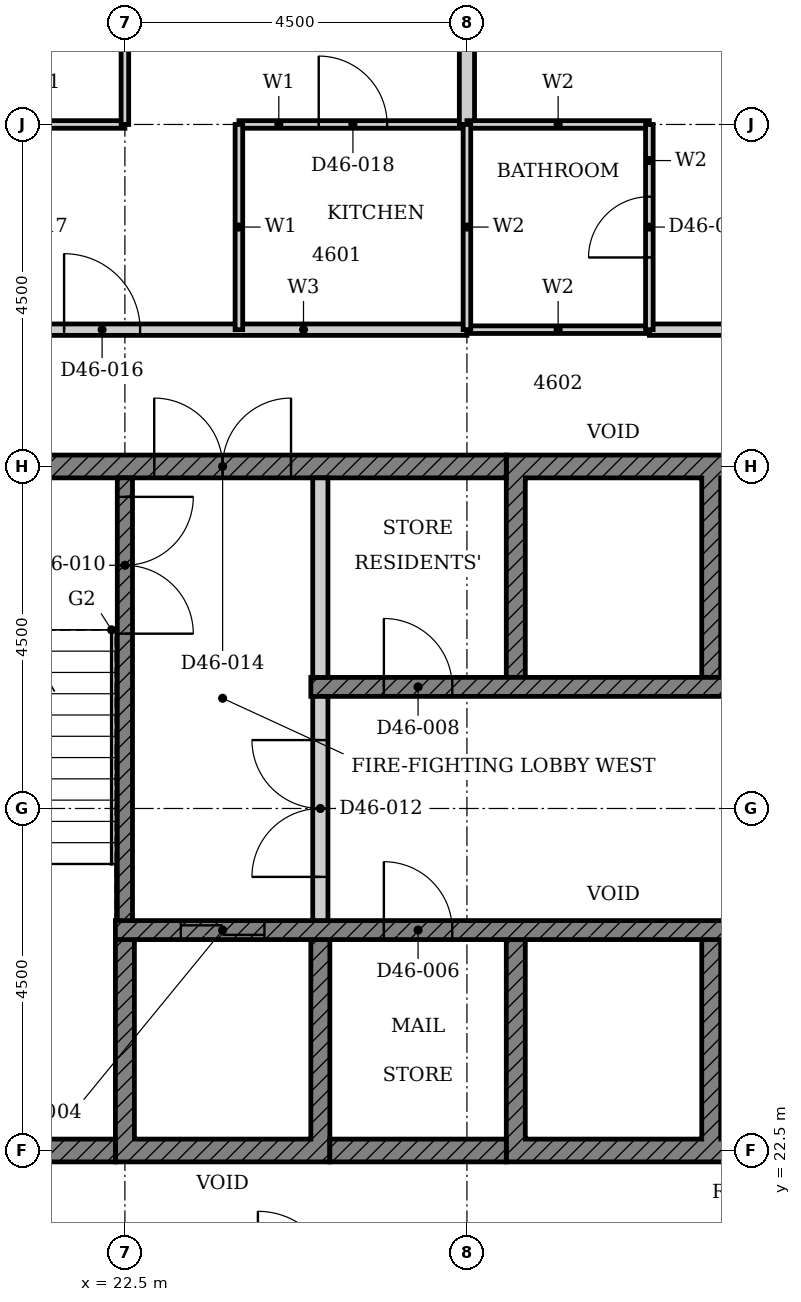
"""IFC4 building model, lengths in metres.
Left out: names, types, materials, properties, quantities, classifications, styles, units other than length and angle.
Written with IfcOpenShell. Run it as: python <this file> out.ifc"""

import sys

from ifc_helpers import new_model, si_unit, direction, frame, frame_2d, origin, place, context, subcontext, project, spatial, polyline, rectangle, outline, extrude, element, fill, save


model = new_model("IFC4")
c1 = context("Model", 3, precision=1e-05, world=origin(), true_north=direction((0.0, 1.0)))
c2 = subcontext(c1, "Body", "Model", "MODEL_VIEW")
j1 = project(units=[si_unit("LENGTHUNIT", "METRE"), si_unit("PLANEANGLEUNIT", "RADIAN")], contexts=[c1])
p1 = place(None, origin())
s1 = spatial("IfcSite", under=j1, at=p1, CompositionType="ELEMENT")
p2 = place(p1, origin())
s2 = spatial("IfcBuilding", under=s1, at=p2, CompositionType="ELEMENT")
p3 = place(p2, frame((0.0, 0.0, 183.9)))
s3 = spatial("IfcBuildingStorey", under=s2, at=p3, CompositionType="ELEMENT", Elevation=183.9)
p4 = place(p3, origin())
e1 = element("IfcWall", 1, at=p4, inside=s3, PredefinedType="SHEAR", context=c2, shape_type="SweptSolid", body=[
    extrude(outline(polyline([(22.375, 22.35), (25.197, 22.35), (25.197, 25.275), (24.947, 25.275), (24.947, 22.65), (22.625, 22.65), (22.625, 25.275), (22.375, 25.275), (22.375, 22.35)])), origin(), (0.0, 0.0, 1.0), 3.3),
])
p5 = place(p3, origin())
e2 = element("IfcWall", 2, at=p5, inside=s3, PredefinedType="SHEAR", context=c2, shape_type="SweptSolid", body=[
    extrude(outline(polyline([(27.518, 22.35), (32.911, 22.35), (32.911, 25.275), (32.661, 25.275), (32.661, 22.65), (30.339, 22.65), (30.339, 25.275), (30.089, 25.275), (30.089, 22.65), (27.768, 22.65), (27.768, 25.275), (27.518, 25.275), (27.518, 22.35)])), origin(), (0.0, 0.0, 1.0), 3.3),
])
p6 = place(p3, origin())
e3 = element("IfcWall", 3, at=p6, inside=s3, PredefinedType="SHEAR", context=c2, shape_type="SweptSolid", body=[
    extrude(outline(polyline([(27.518, 28.725), (27.768, 28.725), (27.768, 31.35), (30.089, 31.35), (30.089, 28.725), (30.339, 28.725), (30.339, 31.35), (32.661, 31.35), (32.661, 28.725), (32.911, 28.725), (32.911, 31.65), (27.518, 31.65), (27.518, 28.725)])), origin(), (0.0, 0.0, 1.0), 3.3),
])
p7 = place(p3, frame((18.15, 22.5, 0.0), z_axis=(0.0, 0.0, 1.0), x_axis=(1.0, 0.0, 0.0)))
e4 = element("IfcWall", 4, at=p7, inside=s3, PredefinedType="SHEAR", context=c2, shape_type="SweptSolid", body=[
    extrude(rectangle(XDim=4.225, YDim=0.3, at=frame_2d((2.113, 0.0))), origin(), (0.0, 0.0, 1.0), 3.3),
])
p8 = place(p3, frame((25.197, 22.5, 0.0), z_axis=(0.0, 0.0, 1.0), x_axis=(1.0, 0.0, 0.0)))
e5 = element("IfcWall", 5, at=p8, inside=s3, PredefinedType="SHEAR", context=c2, shape_type="SweptSolid", body=[
    extrude(rectangle(XDim=2.321, YDim=0.3, at=frame_2d((1.161, 0.0))), origin(), (0.0, 0.0, 1.0), 3.3),
])
p9 = place(p3, frame((18.15, 31.5, 0.0), z_axis=(0.0, 0.0, 1.0), x_axis=(1.0, 0.0, 0.0)))
e6 = element("IfcWall", 6, at=p9, inside=s3, PredefinedType="SHEAR", context=c2, shape_type="SweptSolid", body=[
    extrude(rectangle(XDim=9.368, YDim=0.3, at=frame_2d((4.684, 0.0))), origin(), (0.0, 0.0, 1.0), 3.3),
])
p10 = place(p9, frame((4.736, 0.0, 0.0)))
e7 = element("IfcOpeningElement", 7, at=p10, cuts=e6, PredefinedType="OPENING", context=c2, shape_type="SweptSolid", body=[
    extrude(rectangle(XDim=1.8, YDim=2.1, at=frame_2d((0.9, 1.05))), frame((0.0, 0.16, 0.0), z_axis=(0.0, -1.0, 0.0), x_axis=(1.0, 0.0, 0.0)), (0.0, 0.0, 1.0), 0.32),
])
p11 = place(p3, frame((22.375, 25.4, 0.0), z_axis=(0.0, 0.0, 1.0), x_axis=(1.0, 0.0, 0.0)))
e8 = element("IfcWall", 8, at=p11, inside=s3, PredefinedType="SHEAR", context=c2, shape_type="SweptSolid", body=[
    extrude(rectangle(XDim=15.678, YDim=0.25, at=frame_2d((7.839, 0.0))), origin(), (0.0, 0.0, 1.0), 3.3),
])
p12 = place(p11, frame((8.575, 0.0, 0.0)))
e9 = element("IfcOpeningElement", 9, at=p12, cuts=e8, PredefinedType="OPENING", context=c2, shape_type="SweptSolid", body=[
    extrude(rectangle(XDim=1.1, YDim=2.1, at=frame_2d((0.55, 1.05))), frame((0.0, 0.135, 0.0), z_axis=(0.0, -1.0, 0.0), x_axis=(1.0, 0.0, 0.0)), (0.0, 0.0, 1.0), 0.27),
])
p13 = place(p11, frame((0.861, 0.0, 0.0)))
e10 = element("IfcOpeningElement", 10, at=p13, cuts=e8, PredefinedType="OPENING", context=c2, shape_type="SweptSolid", body=[
    extrude(rectangle(XDim=1.1, YDim=2.1, at=frame_2d((0.55, 1.05))), frame((0.0, 0.135, 0.0), z_axis=(0.0, -1.0, 0.0), x_axis=(1.0, 0.0, 0.0)), (0.0, 0.0, 1.0), 0.27),
])
p14 = place(p11, frame((3.532, 0.0, 0.0)))
e11 = element("IfcOpeningElement", 11, at=p14, cuts=e8, PredefinedType="OPENING", context=c2, shape_type="SweptSolid", body=[
    extrude(rectangle(XDim=0.9, YDim=2.1, at=frame_2d((0.45, 1.05))), frame((0.0, 0.135, 0.0), z_axis=(0.0, -1.0, 0.0), x_axis=(1.0, 0.0, 0.0)), (0.0, 0.0, 1.0), 0.27),
])
p15 = place(p11, frame((12.532, 0.0, 0.0)))
e12 = element("IfcOpeningElement", 12, at=p15, cuts=e8, PredefinedType="OPENING", context=c2, shape_type="SweptSolid", body=[
    extrude(rectangle(XDim=0.9, YDim=2.1, at=frame_2d((0.45, 1.05))), frame((0.0, 0.135, 0.0), z_axis=(0.0, -1.0, 0.0), x_axis=(1.0, 0.0, 0.0)), (0.0, 0.0, 1.0), 0.27),
])
p16 = place(p3, frame((24.947, 28.6, 0.0), z_axis=(0.0, 0.0, 1.0), x_axis=(1.0, 0.0, 0.0)))
e13 = element("IfcWall", 13, at=p16, inside=s3, PredefinedType="SHEAR", context=c2, shape_type="SweptSolid", body=[
    extrude(rectangle(XDim=15.678, YDim=0.25, at=frame_2d((7.839, 0.0))), origin(), (0.0, 0.0, 1.0), 3.3),
])
p17 = place(p16, frame((6.004, 0.0, 0.0)))
e14 = element("IfcOpeningElement", 14, at=p17, cuts=e13, PredefinedType="OPENING", context=c2, shape_type="SweptSolid", body=[
    extrude(rectangle(XDim=1.1, YDim=2.1, at=frame_2d((0.55, 1.05))), frame((0.0, 0.135, 0.0), z_axis=(0.0, -1.0, 0.0), x_axis=(1.0, 0.0, 0.0)), (0.0, 0.0, 1.0), 0.27),
])
p18 = place(p16, frame((11.146, 0.0, 0.0)))
e15 = element("IfcOpeningElement", 15, at=p18, cuts=e13, PredefinedType="OPENING", context=c2, shape_type="SweptSolid", body=[
    extrude(rectangle(XDim=1.1, YDim=2.1, at=frame_2d((0.55, 1.05))), frame((0.0, 0.135, 0.0), z_axis=(0.0, -1.0, 0.0), x_axis=(1.0, 0.0, 0.0)), (0.0, 0.0, 1.0), 0.27),
])
p19 = place(p16, frame((13.718, 0.0, 0.0)))
e16 = element("IfcOpeningElement", 16, at=p19, cuts=e13, PredefinedType="OPENING", context=c2, shape_type="SweptSolid", body=[
    extrude(rectangle(XDim=1.1, YDim=2.1, at=frame_2d((0.55, 1.05))), frame((0.0, 0.135, 0.0), z_axis=(0.0, -1.0, 0.0), x_axis=(1.0, 0.0, 0.0)), (0.0, 0.0, 1.0), 0.27),
])
p20 = place(p16, frame((0.961, 0.0, 0.0)))
e17 = element("IfcOpeningElement", 17, at=p20, cuts=e13, PredefinedType="OPENING", context=c2, shape_type="SweptSolid", body=[
    extrude(rectangle(XDim=0.9, YDim=2.1, at=frame_2d((0.45, 1.05))), frame((0.0, 0.135, 0.0), z_axis=(0.0, -1.0, 0.0), x_axis=(1.0, 0.0, 0.0)), (0.0, 0.0, 1.0), 0.27),
])
p21 = place(p16, frame((8.675, 0.0, 0.0)))
e18 = element("IfcOpeningElement", 18, at=p21, cuts=e13, PredefinedType="OPENING", context=c2, shape_type="SweptSolid", body=[
    extrude(rectangle(XDim=0.9, YDim=2.1, at=frame_2d((0.45, 1.05))), frame((0.0, 0.135, 0.0), z_axis=(0.0, -1.0, 0.0), x_axis=(1.0, 0.0, 0.0)), (0.0, 0.0, 1.0), 0.27),
])
p22 = place(p3, frame((25.072, 28.725, 0.0), z_axis=(0.0, 0.0, 1.0), x_axis=(0.0, 1.0, 0.0)))
e19 = element("IfcWall", 19, at=p22, inside=s3, PredefinedType="PARTITIONING", context=c2, shape_type="SweptSolid", body=[
    extrude(rectangle(XDim=2.625, YDim=0.2, at=frame_2d((1.312, 0.0))), origin(), (0.0, 0.0, 1.0), 3.3),
])
p23 = place(p3, frame((22.5, 31.35, 0.0), z_axis=(0.0, 0.0, 1.0), x_axis=(0.0, -1.0, 0.0)))
e20 = element("IfcWall", 20, at=p23, inside=s3, PredefinedType="SHEAR", context=c2, shape_type="SweptSolid", body=[
    extrude(rectangle(XDim=5.825, YDim=0.2, at=frame_2d((2.913, 0.0))), origin(), (0.0, 0.0, 1.0), 3.3),
])
p24 = place(p23, frame((0.25, 0.0, 0.0)))
e21 = element("IfcOpeningElement", 21, at=p24, cuts=e20, PredefinedType="OPENING", context=c2, shape_type="SweptSolid", body=[
    extrude(rectangle(XDim=1.8, YDim=2.1, at=frame_2d((0.9, 1.05))), frame((0.0, 0.11, 0.0), z_axis=(0.0, -1.0, 0.0), x_axis=(1.0, 0.0, 0.0)), (0.0, 0.0, 1.0), 0.22),
])
p25 = place(p3, frame((25.072, 25.525, 0.0), z_axis=(0.0, 0.0, 1.0), x_axis=(0.0, 1.0, 0.0)))
e22 = element("IfcWall", 22, at=p25, inside=s3, PredefinedType="PARTITIONING", context=c2, shape_type="SweptSolid", body=[
    extrude(rectangle(XDim=2.95, YDim=0.2, at=frame_2d((1.475, 0.0))), origin(), (0.0, 0.0, 1.0), 3.3),
])
p26 = place(p25, frame((0.575, 0.0, 0.0)))
e23 = element("IfcOpeningElement", 23, at=p26, cuts=e22, PredefinedType="OPENING", context=c2, shape_type="SweptSolid", body=[
    extrude(rectangle(XDim=1.8, YDim=2.1, at=frame_2d((0.9, 1.05))), frame((0.0, 0.11, 0.0), z_axis=(0.0, -1.0, 0.0), x_axis=(1.0, 0.0, 0.0)), (0.0, 0.0, 1.0), 0.22),
])
p27 = place(p3, frame((20.4, 33.3, 0.0), z_axis=(0.0, 0.0, 1.0), x_axis=(1.0, 0.0, 0.0)))
e24 = element("IfcWall", 24, at=p27, inside=s3, PredefinedType="PARTITIONING", context=c2, shape_type="SweptSolid", body=[
    extrude(rectangle(XDim=6.6, YDim=0.15, at=frame_2d((3.3, 0.0))), origin(), (0.0, 0.0, 1.0), 3.3),
])
p28 = place(p27, frame((1.3, 0.0, 0.0)))
e25 = element("IfcOpeningElement", 25, at=p28, cuts=e24, PredefinedType="OPENING", context=c2, shape_type="SweptSolid", body=[
    extrude(rectangle(XDim=1.0, YDim=2.2, at=frame_2d((0.5, 1.1))), frame((0.0, 0.085, 0.0), z_axis=(0.0, -1.0, 0.0), x_axis=(1.0, 0.0, 0.0)), (0.0, 0.0, 1.0), 0.17),
])
p29 = place(p3, frame((29.4, 33.3, 0.0), z_axis=(0.0, 0.0, 1.0), x_axis=(1.0, 0.0, 0.0)))
e26 = element("IfcWall", 26, at=p29, inside=s3, PredefinedType="PARTITIONING", context=c2, shape_type="SweptSolid", body=[
    extrude(rectangle(XDim=13.2, YDim=0.15, at=frame_2d((6.6, 0.0))), origin(), (0.0, 0.0, 1.0), 3.3),
])
p30 = place(p29, frame((1.3, 0.0, 0.0)))
e27 = element("IfcOpeningElement", 27, at=p30, cuts=e26, PredefinedType="OPENING", context=c2, shape_type="SweptSolid", body=[
    extrude(rectangle(XDim=1.0, YDim=2.2, at=frame_2d((0.5, 1.1))), frame((0.0, 0.085, 0.0), z_axis=(0.0, -1.0, 0.0), x_axis=(1.0, 0.0, 0.0)), (0.0, 0.0, 1.0), 0.17),
])
p31 = place(p29, frame((10.9, 0.0, 0.0)))
e28 = element("IfcOpeningElement", 28, at=p31, cuts=e26, PredefinedType="OPENING", context=c2, shape_type="SweptSolid", body=[
    extrude(rectangle(XDim=1.0, YDim=2.2, at=frame_2d((0.5, 1.1))), frame((0.0, 0.085, 0.0), z_axis=(0.0, -1.0, 0.0), x_axis=(1.0, 0.0, 0.0)), (0.0, 0.0, 1.0), 0.17),
])
p32 = place(p3, frame((20.4, 36.0, 0.0), z_axis=(0.0, 0.0, 1.0), x_axis=(1.0, 0.0, 0.0)))
e29 = element("IfcWall", 29, at=p32, inside=s3, PredefinedType="PARTITIONING", context=c2, shape_type="SweptSolid", body=[
    extrude(rectangle(XDim=2.1, YDim=0.1, at=frame_2d((1.05, 0.0))), origin(), (0.0, 0.0, 1.0), 3.3),
])
p33 = place(p3, frame((24.0, 36.0, 0.0), z_axis=(0.0, 0.0, 1.0), x_axis=(1.0, 0.0, 0.0)))
e30 = element("IfcWall", 30, at=p33, inside=s3, PredefinedType="PARTITIONING", context=c2, shape_type="SweptSolid", body=[
    extrude(rectangle(XDim=3.0, YDim=0.1, at=frame_2d((1.5, 0.0))), origin(), (0.0, 0.0, 1.0), 3.3),
])
p34 = place(p33, frame((1.05, 0.0, 0.0)))
e31 = element("IfcOpeningElement", 31, at=p34, cuts=e30, PredefinedType="OPENING", context=c2, shape_type="SweptSolid", body=[
    extrude(rectangle(XDim=0.9, YDim=2.1, at=frame_2d((0.45, 1.05))), frame((0.0, 0.06, 0.0), z_axis=(0.0, -1.0, 0.0), x_axis=(1.0, 0.0, 0.0)), (0.0, 0.0, 1.0), 0.12),
])
p35 = place(p3, frame((22.5, 36.0, 0.0), z_axis=(0.0, 0.0, 1.0), x_axis=(0.0, 1.0, 0.0)))
e32 = element("IfcWall", 32, at=p35, inside=s3, PredefinedType="PARTITIONING", context=c2, shape_type="SweptSolid", body=[
    extrude(rectangle(XDim=4.815, YDim=0.1, at=frame_2d((2.407, 0.0))), origin(), (0.0, 0.0, 1.0), 3.3),
])
p36 = place(p35, frame((1.8, 0.0, 0.0)))
e33 = element("IfcOpeningElement", 33, at=p36, cuts=e32, PredefinedType="OPENING", context=c2, shape_type="SweptSolid", body=[
    extrude(rectangle(XDim=0.9, YDim=2.1, at=frame_2d((0.45, 1.05))), frame((0.0, 0.06, 0.0), z_axis=(0.0, -1.0, 0.0), x_axis=(1.0, 0.0, 0.0)), (0.0, 0.0, 1.0), 0.12),
])
p37 = place(p3, frame((24.0, 33.3, 0.0), z_axis=(0.0, 0.0, 1.0), x_axis=(0.0, 1.0, 0.0)))
e34 = element("IfcWall", 34, at=p37, inside=s3, PredefinedType="PARTITIONING", context=c2, shape_type="SweptSolid", body=[
    extrude(rectangle(XDim=2.7, YDim=0.1, at=frame_2d((1.35, 0.0))), origin(), (0.0, 0.0, 1.0), 3.3),
])
p38 = place(p3, frame((27.0, 36.0, 0.0), z_axis=(0.0, 0.0, 1.0), x_axis=(0.0, 1.0, 0.0)))
e35 = element("IfcWall", 35, at=p38, inside=s3, PredefinedType="PARTITIONING", context=c2, shape_type="SweptSolid", body=[
    extrude(rectangle(XDim=4.69, YDim=0.2, at=frame_2d((2.345, 0.0))), origin(), (0.0, 0.0, 1.0), 3.3),
])
for number, where, z_axis, x_axis in (
    (36, (27.0, 33.3, 0.0), (0.0, 0.0, 1.0), (1.0, 0.0, 0.0)),
    (37, (27.0, 36.0, 0.0), (0.0, 0.0, 1.0), (1.0, 0.0, 0.0)),
):
    element("IfcWall", number, at=place(p3, frame(where, z_axis=z_axis, x_axis=x_axis)), inside=s3, PredefinedType="PARTITIONING", context=c2, shape_type="SweptSolid", body=[
        extrude(rectangle(XDim=2.4, YDim=0.1, at=frame_2d((1.2, 0.0))), origin(), (0.0, 0.0, 1.0), 3.3),
    ])
p39 = place(p3, frame((27.0, 33.3, 0.0), z_axis=(0.0, 0.0, 1.0), x_axis=(0.0, 1.0, 0.0)))
e38 = element("IfcWall", 38, at=p39, inside=s3, PredefinedType="PARTITIONING", context=c2, shape_type="SweptSolid", body=[
    extrude(rectangle(XDim=2.7, YDim=0.1, at=frame_2d((1.35, 0.0))), origin(), (0.0, 0.0, 1.0), 3.3),
])
p40 = place(p3, frame((29.4, 33.3, 0.0), z_axis=(0.0, 0.0, 1.0), x_axis=(0.0, 1.0, 0.0)))
e39 = element("IfcWall", 39, at=p40, inside=s3, PredefinedType="PARTITIONING", context=c2, shape_type="SweptSolid", body=[
    extrude(rectangle(XDim=2.7, YDim=0.1, at=frame_2d((1.35, 0.0))), origin(), (0.0, 0.0, 1.0), 3.3),
])
p41 = place(p40, frame((0.95, 0.0, 0.0)))
e40 = element("IfcOpeningElement", 40, at=p41, cuts=e39, PredefinedType="OPENING", context=c2, shape_type="SweptSolid", body=[
    extrude(rectangle(XDim=0.8, YDim=2.1, at=frame_2d((0.4, 1.05))), frame((0.0, 0.06, 0.0), z_axis=(0.0, -1.0, 0.0), x_axis=(1.0, 0.0, 0.0)), (0.0, 0.0, 1.0), 0.12),
])
p42 = place(p13, origin())
e41 = element("IfcDoor", 41, at=p42, inside=s3, OperationType="DOUBLE_DOOR_SLIDING", PredefinedType="DOOR", context=c2, shape_type="SweptSolid", body=[
    extrude(rectangle(XDim=1.1, YDim=2.1, at=frame_2d((0.55, 1.05))), frame((0.0, 0.025, 0.0), z_axis=(0.0, -1.0, 0.0), x_axis=(1.0, 0.0, 0.0)), (0.0, 0.0, 1.0), 0.05),
])
fill(e10, e41)
p43 = place(p14, origin())
e42 = element("IfcDoor", 42, at=p43, inside=s3, OperationType="SINGLE_SWING_LEFT", PredefinedType="DOOR", context=c2, shape_type="SweptSolid", body=[
    extrude(rectangle(XDim=0.9, YDim=2.1, at=frame_2d((0.45, 1.05))), frame((0.0, 0.025, 0.0), z_axis=(0.0, -1.0, 0.0), x_axis=(1.0, 0.0, 0.0)), (0.0, 0.0, 1.0), 0.05),
])
fill(e11, e42)
p44 = place(p20, origin())
e43 = element("IfcDoor", 43, at=p44, inside=s3, OperationType="SINGLE_SWING_LEFT", PredefinedType="DOOR", context=c2, shape_type="SweptSolid", body=[
    extrude(rectangle(XDim=0.9, YDim=2.1, at=frame_2d((0.45, 1.05))), frame((0.0, 0.025, 0.0), z_axis=(0.0, -1.0, 0.0), x_axis=(1.0, 0.0, 0.0)), (0.0, 0.0, 1.0), 0.05),
])
fill(e17, e43)
p45 = place(p24, origin())
e44 = element("IfcDoor", 44, at=p45, inside=s3, OperationType="DOUBLE_DOOR_SINGLE_SWING", PredefinedType="DOOR", context=c2, shape_type="SweptSolid", body=[
    extrude(rectangle(XDim=1.8, YDim=2.1, at=frame_2d((0.9, 1.05))), frame((0.0, 0.025, 0.0), z_axis=(0.0, -1.0, 0.0), x_axis=(1.0, 0.0, 0.0)), (0.0, 0.0, 1.0), 0.05),
])
fill(e21, e44)
p46 = place(p26, origin())
e45 = element("IfcDoor", 45, at=p46, inside=s3, OperationType="DOUBLE_DOOR_SINGLE_SWING", PredefinedType="DOOR", context=c2, shape_type="SweptSolid", body=[
    extrude(rectangle(XDim=1.8, YDim=2.1, at=frame_2d((0.9, 1.05))), frame((0.0, 0.025, 0.0), z_axis=(0.0, -1.0, 0.0), x_axis=(1.0, 0.0, 0.0)), (0.0, 0.0, 1.0), 0.05),
])
fill(e23, e45)
p47 = place(p10, origin())
e46 = element("IfcDoor", 46, at=p47, inside=s3, OperationType="DOUBLE_DOOR_SINGLE_SWING", PredefinedType="DOOR", context=c2, shape_type="SweptSolid", body=[
    extrude(rectangle(XDim=1.8, YDim=2.1, at=frame_2d((0.9, 1.05))), frame((0.0, 0.025, 0.0), z_axis=(0.0, -1.0, 0.0), x_axis=(1.0, 0.0, 0.0)), (0.0, 0.0, 1.0), 0.05),
])
fill(e7, e46)
p48 = place(p28, origin())
e47 = element("IfcDoor", 47, at=p48, inside=s3, OperationType="SINGLE_SWING_LEFT", PredefinedType="DOOR", context=c2, shape_type="SweptSolid", body=[
    extrude(rectangle(XDim=1.0, YDim=2.2, at=frame_2d((0.5, 1.1))), frame((0.0, 0.025, 0.0), z_axis=(0.0, -1.0, 0.0), x_axis=(1.0, 0.0, 0.0)), (0.0, 0.0, 1.0), 0.05),
])
fill(e25, e47)
p49 = place(p34, origin())
e48 = element("IfcDoor", 48, at=p49, inside=s3, OperationType="SINGLE_SWING_RIGHT", PredefinedType="DOOR", context=c2, shape_type="SweptSolid", body=[
    extrude(rectangle(XDim=0.9, YDim=2.1, at=frame_2d((0.45, 1.05))), frame((0.0, 0.025, 0.0), z_axis=(0.0, -1.0, 0.0), x_axis=(1.0, 0.0, 0.0)), (0.0, 0.0, 1.0), 0.05),
])
fill(e31, e48)
p50 = place(p41, origin())
e49 = element("IfcDoor", 49, at=p50, inside=s3, OperationType="SINGLE_SWING_LEFT", PredefinedType="DOOR", context=c2, shape_type="SweptSolid", body=[
    extrude(rectangle(XDim=0.8, YDim=2.1, at=frame_2d((0.4, 1.05))), frame((0.0, 0.025, 0.0), z_axis=(0.0, -1.0, 0.0), x_axis=(1.0, 0.0, 0.0)), (0.0, 0.0, 1.0), 0.05),
])
fill(e40, e49)
save(model, sys.argv[1])
